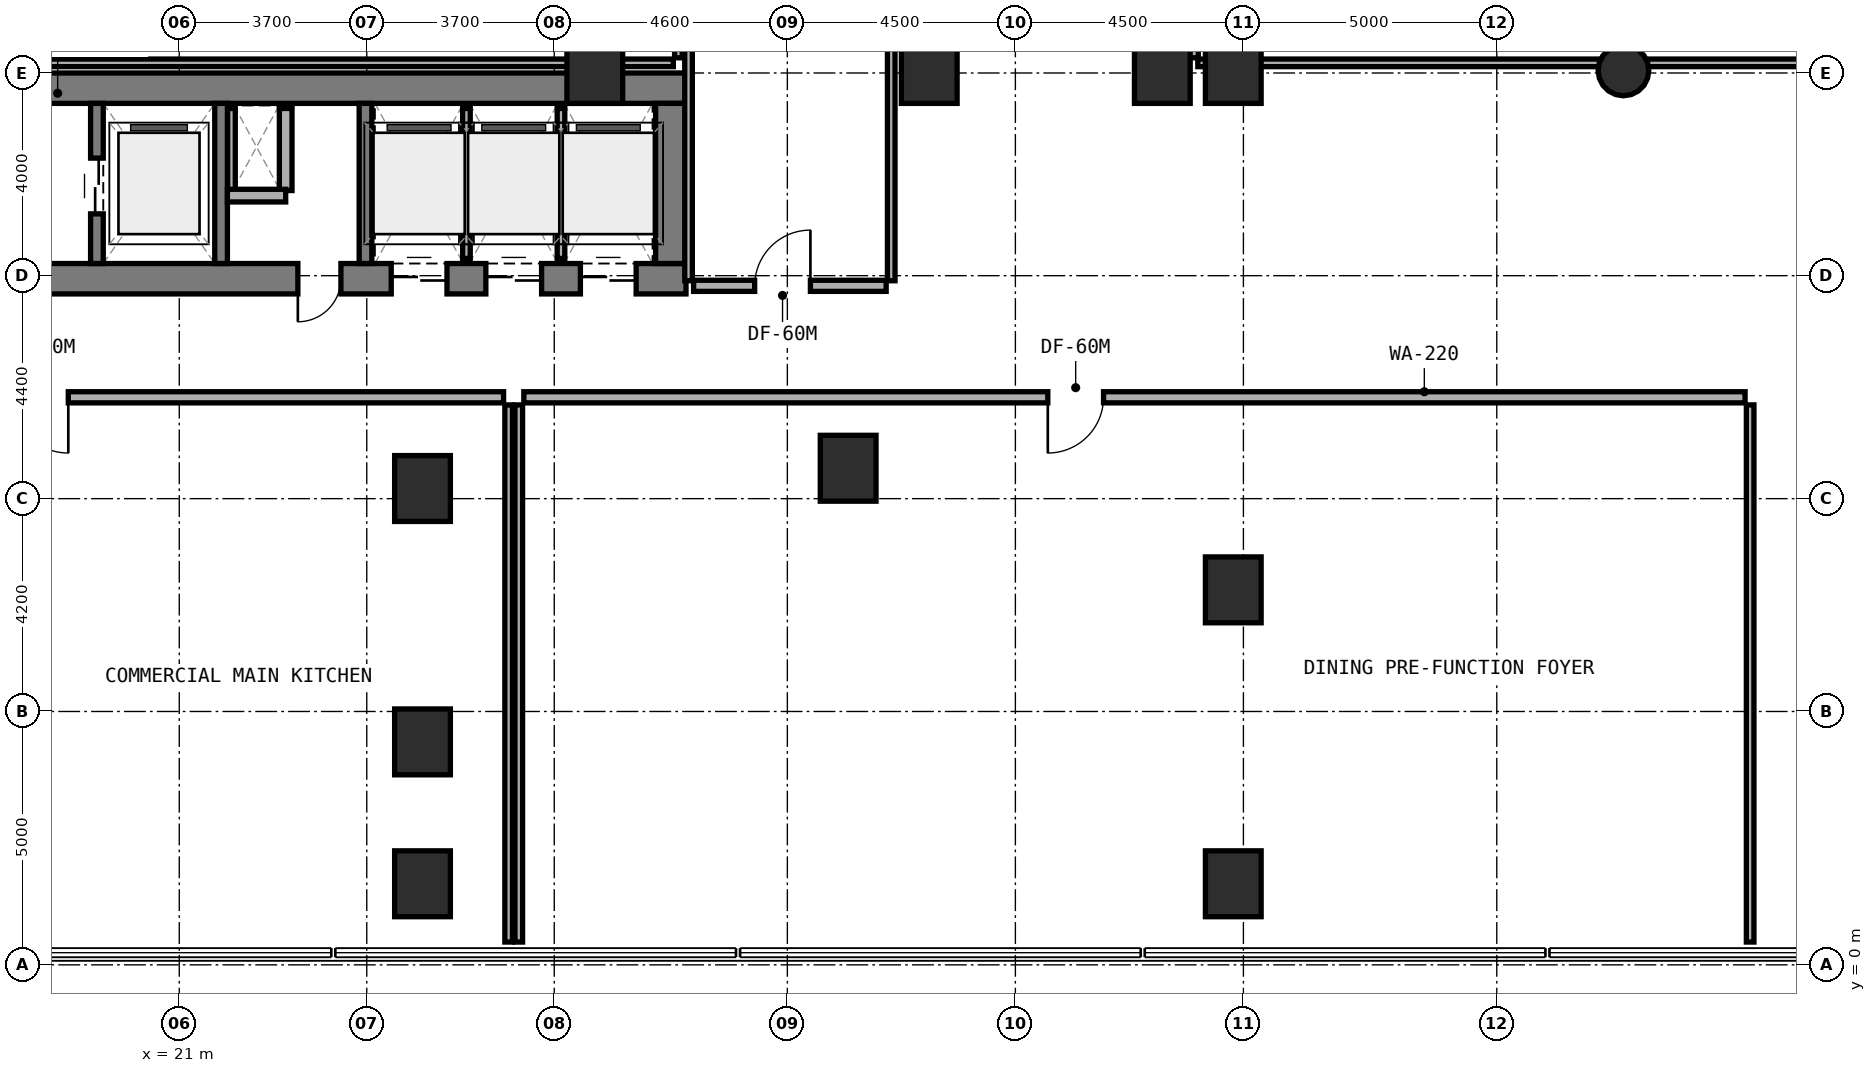
"""IFC4 building model, lengths in metres.
Left out: names, types, materials, properties, quantities, classifications, styles, units other than length and angle.
Written with IfcOpenShell. Run it as: python <this file> out.ifc"""

import sys

from ifc_helpers import new_model, si_unit, direction, frame, frame_2d, origin, origin_2d, place, context, subcontext, project, spatial, rectangle, circle, extrude, element, fill, save


model = new_model("IFC4")
c1 = context("Model", 3, precision=1e-05, world=origin(), true_north=direction((0.0, 1.0)))
c2 = subcontext(c1, "Body", "Model", "MODEL_VIEW")
j1 = project(units=[si_unit("LENGTHUNIT", "METRE"), si_unit("PLANEANGLEUNIT", "RADIAN")], contexts=[c1])
p1 = place(None, origin())
s1 = spatial("IfcSite", under=j1, at=p1, CompositionType="ELEMENT")
p2 = place(p1, origin())
s2 = spatial("IfcBuilding", under=s1, at=p2, CompositionType="ELEMENT")
p3 = place(p2, frame((0.0, 0.0, 5.4)))
s3 = spatial("IfcBuildingStorey", under=s2, at=p3, CompositionType="ELEMENT", Elevation=5.4)
p4 = place(p3, frame((6.2, 13.54, 0.0), z_axis=(0.0, 0.0, 1.0), x_axis=(1.0, 0.0, 0.0)))
e1 = element("IfcWall", 1, at=p4, inside=s3, PredefinedType="SHEAR", context=c2, shape_type="SweptSolid", body=[
    extrude(rectangle(XDim=24.8, YDim=0.6, at=frame_2d((12.4, 0.0))), origin(), (0.0, 0.0, 1.0), 4.8),
])
p5 = place(p4, frame((9.35, 0.0, 0.0)))
e2 = element("IfcOpeningElement", 2, at=p5, cuts=e1, PredefinedType="OPENING", context=c2, shape_type="SweptSolid", body=[
    extrude(rectangle(XDim=1.2, YDim=2.15, at=frame_2d((0.6, 1.075))), frame((0.0, 0.31, 0.0), z_axis=(0.0, -1.0, 0.0), x_axis=(1.0, 0.0, 0.0)), (0.0, 0.0, 1.0), 0.62),
])
p6 = place(p4, frame((17.14, 0.0, 0.0)))
e3 = element("IfcOpeningElement", 3, at=p6, cuts=e1, PredefinedType="OPENING", context=c2, shape_type="SweptSolid", body=[
    extrude(rectangle(XDim=0.85, YDim=2.1, at=frame_2d((0.425, 1.05))), frame((0.0, 0.31, 0.0), z_axis=(0.0, -1.0, 0.0), x_axis=(1.0, 0.0, 0.0)), (0.0, 0.0, 1.0), 0.62),
])
p7 = place(p4, frame((18.983, 0.0, 0.0)))
e4 = element("IfcOpeningElement", 4, at=p7, cuts=e1, PredefinedType="OPENING", context=c2, shape_type="SweptSolid", body=[
    extrude(rectangle(XDim=1.1, YDim=2.15, at=frame_2d((0.55, 1.075))), frame((0.0, 0.31, 0.0), z_axis=(0.0, -1.0, 0.0), x_axis=(1.0, 0.0, 0.0)), (0.0, 0.0, 1.0), 0.62),
])
p8 = place(p4, frame((20.85, 0.0, 0.0)))
e5 = element("IfcOpeningElement", 5, at=p8, cuts=e1, PredefinedType="OPENING", context=c2, shape_type="SweptSolid", body=[
    extrude(rectangle(XDim=1.1, YDim=2.15, at=frame_2d((0.55, 1.075))), frame((0.0, 0.31, 0.0), z_axis=(0.0, -1.0, 0.0), x_axis=(1.0, 0.0, 0.0)), (0.0, 0.0, 1.0), 0.62),
])
p9 = place(p4, frame((22.716, 0.0, 0.0)))
e6 = element("IfcOpeningElement", 6, at=p9, cuts=e1, PredefinedType="OPENING", context=c2, shape_type="SweptSolid", body=[
    extrude(rectangle(XDim=1.1, YDim=2.15, at=frame_2d((0.55, 1.075))), frame((0.0, 0.31, 0.0), z_axis=(0.0, -1.0, 0.0), x_axis=(1.0, 0.0, 0.0)), (0.0, 0.0, 1.0), 0.62),
])
p10 = place(p3, frame((6.2, 17.3, 0.0), z_axis=(0.0, 0.0, 1.0), x_axis=(1.0, 0.0, 0.0)))
e7 = element("IfcWall", 7, at=p10, inside=s3, PredefinedType="SHEAR", context=c2, shape_type="SweptSolid", body=[
    extrude(rectangle(XDim=24.8, YDim=0.6, at=frame_2d((12.4, 0.0))), origin(), (0.0, 0.0, 1.0), 4.8),
])
p11 = place(p3, frame((30.7, 13.84, 0.0), z_axis=(0.0, 0.0, 1.0), x_axis=(0.0, 1.0, 0.0)))
e8 = element("IfcWall", 8, at=p11, inside=s3, PredefinedType="SHEAR", context=c2, shape_type="SweptSolid", body=[
    extrude(rectangle(XDim=3.16, YDim=0.6, at=frame_2d((1.58, 0.0))), origin(), (0.0, 0.0, 1.0), 4.8),
])
p12 = place(p3, frame((19.375, 13.84, 0.0), z_axis=(0.0, 0.0, 1.0), x_axis=(0.0, 1.0, 0.0)))
e9 = element("IfcWall", 9, at=p12, inside=s3, PredefinedType="STANDARD", context=c2, shape_type="SweptSolid", body=[
    extrude(rectangle(XDim=3.16, YDim=0.25, at=frame_2d((1.58, 0.0))), origin(), (0.0, 0.0, 1.0), 4.45),
])
p13 = place(p12, frame((0.98, 0.0, 0.0)))
e10 = element("IfcOpeningElement", 10, at=p13, cuts=e9, PredefinedType="OPENING", context=c2, shape_type="SweptSolid", body=[
    extrude(rectangle(XDim=1.1, YDim=2.15, at=frame_2d((0.55, 1.075))), frame((0.0, 0.135, 0.0), z_axis=(0.0, -1.0, 0.0), x_axis=(1.0, 0.0, 0.0)), (0.0, 0.0, 1.0), 0.27),
])
for number, where, z_axis, x_axis in (
    (11, (21.825, 13.84, 0.0), (0.0, 0.0, 1.0), (0.0, 1.0, 0.0)),
    (12, (24.675, 13.84, 0.0), (0.0, 0.0, 1.0), (0.0, 1.0, 0.0)),
):
    element("IfcWall", number, at=place(p3, frame(where, z_axis=z_axis, x_axis=x_axis)), inside=s3, PredefinedType="STANDARD", context=c2, shape_type="SweptSolid", body=[
        extrude(rectangle(XDim=3.16, YDim=0.25, at=frame_2d((1.58, 0.0))), origin(), (0.0, 0.0, 1.0), 4.45),
    ])
for number, where, z_axis, x_axis in (
    (13, (25.8, 9.4, 0.0), (0.0, 0.0, 1.0), (1.0, 0.0, 0.0)),
    (14, (34.2, 9.8, 0.0), (0.0, 0.0, 1.0), (1.0, 0.0, 0.0)),
    (15, (35.8, 17.65, 0.0), (0.0, 0.0, 1.0), (1.0, 0.0, 0.0)),
    (16, (29.2, 17.65, 0.0), (0.0, 0.0, 1.0), (1.0, 0.0, 0.0)),
    (17, (40.4, 17.65, 0.0), (0.0, 0.0, 1.0), (1.0, 0.0, 0.0)),
    (18, (41.8, 17.65, 0.0), (0.0, 0.0, 1.0), (1.0, 0.0, 0.0)),
):
    element("IfcColumn", number, at=place(p3, frame(where, z_axis=z_axis, x_axis=x_axis)), inside=s3, PredefinedType="COLUMN", context=c2, shape_type="SweptSolid", body=[
        extrude(rectangle(XDim=1.1, YDim=1.3, at=origin_2d()), origin(), (0.0, 0.0, 1.0), 4.8),
    ])
p14 = place(p3, frame((49.5, 17.65, 0.0), z_axis=(0.0, 0.0, 1.0), x_axis=(1.0, 0.0, 0.0)))
e19 = element("IfcColumn", 19, at=p14, inside=s3, PredefinedType="COLUMN", context=c2, shape_type="SweptSolid", body=[
    extrude(circle(Radius=0.5, at=origin_2d()), origin(), (0.0, 0.0, 1.0), 4.8),
])
for number, where, z_axis, x_axis in (
    (20, (25.8, 1.6, 0.0), (0.0, 0.0, 1.0), (1.0, 0.0, 0.0)),
    (21, (41.8, 1.6, 0.0), (0.0, 0.0, 1.0), (1.0, 0.0, 0.0)),
    (22, (25.8, 4.4, 0.0), (0.0, 0.0, 1.0), (1.0, 0.0, 0.0)),
    (23, (41.8, 7.4, 0.0), (0.0, 0.0, 1.0), (1.0, 0.0, 0.0)),
):
    element("IfcColumn", number, at=place(p3, frame(where, z_axis=z_axis, x_axis=x_axis)), inside=s3, PredefinedType="COLUMN", context=c2, shape_type="SweptSolid", body=[
        extrude(rectangle(XDim=1.1, YDim=1.3, at=origin_2d()), origin(), (0.0, 0.0, 1.0), 4.8),
    ])
p15 = place(p3, frame((22.03, 15.28, 0.0), z_axis=(0.0, 0.0, 1.0), x_axis=(0.0, 1.0, 0.0)))
e24 = element("IfcWall", 24, at=p15, inside=s3, PredefinedType="PARTITIONING", context=c2, shape_type="SweptSolid", body=[
    extrude(rectangle(XDim=1.62, YDim=0.15, at=frame_2d((0.81, 0.0))), origin(), (0.0, 0.0, 1.0), 4.45),
])
p16 = place(p3, frame((23.1, 15.28, 0.0), z_axis=(0.0, 0.0, 1.0), x_axis=(0.0, 1.0, 0.0)))
e25 = element("IfcWall", 25, at=p16, inside=s3, PredefinedType="SOLIDWALL", context=c2, shape_type="SweptSolid", body=[
    extrude(rectangle(XDim=1.62, YDim=0.25, at=frame_2d((0.81, 0.0))), origin(), (0.0, 0.0, 1.0), 4.45),
])
p17 = place(p3, frame((21.95, 15.18, 0.0), z_axis=(0.0, 0.0, 1.0), x_axis=(1.0, 0.0, 0.0)))
e26 = element("IfcWall", 26, at=p17, inside=s3, PredefinedType="SOLIDWALL", context=c2, shape_type="SweptSolid", body=[
    extrude(rectangle(XDim=1.15, YDim=0.25, at=frame_2d((0.575, 0.0))), origin(), (0.0, 0.0, 1.0), 4.45),
])
p18 = place(p3, frame((26.667, 13.94, 0.0), z_axis=(0.0, 0.0, 1.0), x_axis=(0.0, 1.0, 0.0)))
e27 = element("IfcWall", 27, at=p18, inside=s3, PredefinedType="PARTITIONING", context=c2, shape_type="SweptSolid", body=[
    extrude(rectangle(XDim=2.96, YDim=0.15, at=frame_2d((1.48, 0.0))), origin(), (0.0, 0.0, 1.0), 4.45),
])
p19 = place(p3, frame((28.533, 13.94, 0.0), z_axis=(0.0, 0.0, 1.0), x_axis=(0.0, 1.0, 0.0)))
e28 = element("IfcWall", 28, at=p19, inside=s3, PredefinedType="PARTITIONING", context=c2, shape_type="SweptSolid", body=[
    extrude(rectangle(XDim=2.96, YDim=0.15, at=frame_2d((1.48, 0.0))), origin(), (0.0, 0.0, 1.0), 3.525),
])
p20 = place(p3, frame((30.85, 17.9, 0.0), z_axis=(0.0, 0.0, 1.0), x_axis=(0.0, 1.0, 0.0)))
e29 = element("IfcWall", 29, at=p20, inside=s3, PredefinedType="PARTITIONING", context=c2, shape_type="SweptSolid", body=[
    extrude(rectangle(XDim=14.2, YDim=0.15, at=frame_2d((7.1, 0.0))), origin(), (0.0, 0.0, 1.0), 3.425),
])
p21 = place(p3, frame((11.9, 17.8, 0.0), z_axis=(0.0, 0.0, 1.0), x_axis=(1.0, 0.0, 0.0)))
e30 = element("IfcWall", 30, at=p21, inside=s3, PredefinedType="PARTITIONING", context=c2, shape_type="SweptSolid", body=[
    extrude(rectangle(XDim=18.85, YDim=0.15, at=frame_2d((9.425, 0.0))), origin(), (0.0, 0.0, 1.0), 3.525),
])
for number, where, z_axis, x_axis in (
    (31, (31.05, 13.5, 0.0), (0.0, 0.0, 1.0), (0.0, 1.0, 0.0)),
    (32, (35.05, 13.5, 0.0), (0.0, 0.0, 1.0), (0.0, 1.0, 0.0)),
):
    element("IfcWall", number, at=place(p3, frame(where, z_axis=z_axis, x_axis=x_axis)), inside=s3, PredefinedType="PARTITIONING", context=c2, shape_type="SweptSolid", body=[
        extrude(rectangle(XDim=18.6, YDim=0.15, at=frame_2d((9.3, 0.0))), origin(), (0.0, 0.0, 1.0), 3.425),
    ])
p22 = place(p3, frame((31.15, 13.4, 0.0), z_axis=(0.0, 0.0, 1.0), x_axis=(1.0, 0.0, 0.0)))
e33 = element("IfcWall", 33, at=p22, inside=s3, PredefinedType="SOLIDWALL", context=c2, shape_type="SweptSolid", body=[
    extrude(rectangle(XDim=3.8, YDim=0.22, at=frame_2d((1.9, 0.0))), origin(), (0.0, 0.0, 1.0), 3.975),
])
p23 = place(p22, frame((1.205, 0.0, 0.0)))
e34 = element("IfcOpeningElement", 34, at=p23, cuts=e33, PredefinedType="OPENING", context=c2, shape_type="SweptSolid", body=[
    extrude(rectangle(XDim=1.1, YDim=2.1, at=frame_2d((0.55, 1.05))), frame((0.0, 0.12, 0.0), z_axis=(0.0, -1.0, 0.0), x_axis=(1.0, 0.0, 0.0)), (0.0, 0.0, 1.0), 0.24),
])
p24 = place(p3, frame((27.5, 0.45, 0.0), z_axis=(0.0, 0.0, 1.0), x_axis=(0.0, 1.0, 0.0)))
e35 = element("IfcWall", 35, at=p24, inside=s3, PredefinedType="PARTITIONING", context=c2, shape_type="SweptSolid", body=[
    extrude(rectangle(XDim=10.6, YDim=0.15, at=frame_2d((5.3, 0.0))), origin(), (0.0, 0.0, 1.0), 3.975),
])
p25 = place(p3, frame((10.7, 11.2, 0.0), z_axis=(0.0, 0.0, 1.0), x_axis=(1.0, 0.0, 0.0)))
e36 = element("IfcWall", 36, at=p25, inside=s3, PredefinedType="SOLIDWALL", context=c2, shape_type="SweptSolid", body=[
    extrude(rectangle(XDim=16.7, YDim=0.22, at=frame_2d((8.35, 0.0))), origin(), (0.0, 0.0, 1.0), 3.525),
])
p26 = place(p25, frame((7.01, 0.0, 0.0)))
e37 = element("IfcOpeningElement", 37, at=p26, cuts=e36, PredefinedType="OPENING", context=c2, shape_type="SweptSolid", body=[
    extrude(rectangle(XDim=1.1, YDim=2.1, at=frame_2d((0.55, 1.05))), frame((0.0, 0.12, 0.0), z_axis=(0.0, -1.0, 0.0), x_axis=(1.0, 0.0, 0.0)), (0.0, 0.0, 1.0), 0.24),
])
p27 = place(p3, frame((27.7, 0.45, 0.0), z_axis=(0.0, 0.0, 1.0), x_axis=(0.0, 1.0, 0.0)))
e38 = element("IfcWall", 38, at=p27, inside=s3, PredefinedType="PARTITIONING", context=c2, shape_type="SweptSolid", body=[
    extrude(rectangle(XDim=10.6, YDim=0.15, at=frame_2d((5.3, 0.0))), origin(), (0.0, 0.0, 1.0), 3.975),
])
p28 = place(p3, frame((52.0, 0.45, 0.0), z_axis=(0.0, 0.0, 1.0), x_axis=(0.0, 1.0, 0.0)))
e39 = element("IfcWall", 39, at=p28, inside=s3, PredefinedType="PARTITIONING", context=c2, shape_type="SweptSolid", body=[
    extrude(rectangle(XDim=10.6, YDim=0.15, at=frame_2d((5.3, 0.0))), origin(), (0.0, 0.0, 1.0), 3.625),
])
p29 = place(p3, frame((27.8, 11.2, 0.0), z_axis=(0.0, 0.0, 1.0), x_axis=(1.0, 0.0, 0.0)))
e40 = element("IfcWall", 40, at=p29, inside=s3, PredefinedType="SOLIDWALL", context=c2, shape_type="SweptSolid", body=[
    extrude(rectangle(XDim=24.1, YDim=0.22, at=frame_2d((12.05, 0.0))), origin(), (0.0, 0.0, 1.0), 3.725),
])
p30 = place(p29, frame((10.34, 0.0, 0.0)))
e41 = element("IfcOpeningElement", 41, at=p30, cuts=e40, PredefinedType="OPENING", context=c2, shape_type="SweptSolid", body=[
    extrude(rectangle(XDim=1.1, YDim=2.1, at=frame_2d((0.55, 1.05))), frame((0.0, 0.12, 0.0), z_axis=(0.0, -1.0, 0.0), x_axis=(1.0, 0.0, 0.0)), (0.0, 0.0, 1.0), 0.24),
])
p31 = place(p3, frame((41.1, 17.8, 0.0), z_axis=(0.0, 0.0, 1.0), x_axis=(1.0, 0.0, 0.0)))
e42 = element("IfcWall", 42, at=p31, inside=s3, PredefinedType="PARTITIONING", context=c2, shape_type="SweptSolid", body=[
    extrude(rectangle(XDim=16.6, YDim=0.15, at=frame_2d((8.3, 0.0))), origin(), (0.0, 0.0, 1.0), 3.725),
])
p32 = place(p3, frame((41.0, 17.9, 0.0), z_axis=(0.0, 0.0, 1.0), x_axis=(0.0, 1.0, 0.0)))
e43 = element("IfcWall", 43, at=p32, inside=s3, PredefinedType="SOLIDWALL", context=c2, shape_type="SweptSolid", body=[
    extrude(rectangle(XDim=14.2, YDim=0.22, at=frame_2d((7.1, 0.0))), origin(), (0.0, 0.0, 1.0), 4.45),
])
p33 = place(p32, frame((5.885, 0.0, 0.0)))
e44 = element("IfcOpeningElement", 44, at=p33, cuts=e43, PredefinedType="OPENING", context=c2, shape_type="SweptSolid", body=[
    extrude(rectangle(XDim=1.1, YDim=2.1, at=frame_2d((0.55, 1.05))), frame((0.0, 0.12, 0.0), z_axis=(0.0, -1.0, 0.0), x_axis=(1.0, 0.0, 0.0)), (0.0, 0.0, 1.0), 0.24),
])
p34 = place(p13, origin())
e45 = element("IfcDoor", 45, at=p34, inside=s3, OperationType="DOUBLE_DOOR_SLIDING", PredefinedType="DOOR", context=c2, shape_type="SweptSolid", body=[
    extrude(rectangle(XDim=1.1, YDim=2.15, at=frame_2d((0.55, 1.075))), frame((0.0, 0.025, 0.0), z_axis=(0.0, -1.0, 0.0), x_axis=(1.0, 0.0, 0.0)), (0.0, 0.0, 1.0), 0.05),
])
fill(e10, e45)
p35 = place(p6, frame((0.85, 0.0, 0.0), z_axis=(0.0, 0.0, 1.0), x_axis=(-1.0, 0.0, 0.0)))
e46 = element("IfcDoor", 46, at=p35, inside=s3, OperationType="SINGLE_SWING_RIGHT", PredefinedType="DOOR", context=c2, shape_type="SweptSolid", body=[
    extrude(rectangle(XDim=0.85, YDim=2.1, at=frame_2d((0.425, 1.05))), frame((0.0, 0.025, 0.0), z_axis=(0.0, -1.0, 0.0), x_axis=(1.0, 0.0, 0.0)), (0.0, 0.0, 1.0), 0.05),
])
fill(e3, e46)
p36 = place(p7, frame((1.1, 0.0, 0.0), z_axis=(0.0, 0.0, 1.0), x_axis=(-1.0, 0.0, 0.0)))
e47 = element("IfcDoor", 47, at=p36, inside=s3, OperationType="DOUBLE_DOOR_SLIDING", PredefinedType="DOOR", context=c2, shape_type="SweptSolid", body=[
    extrude(rectangle(XDim=1.1, YDim=2.15, at=frame_2d((0.55, 1.075))), frame((0.0, 0.025, 0.0), z_axis=(0.0, -1.0, 0.0), x_axis=(1.0, 0.0, 0.0)), (0.0, 0.0, 1.0), 0.05),
])
fill(e4, e47)
p37 = place(p8, frame((1.1, 0.0, 0.0), z_axis=(0.0, 0.0, 1.0), x_axis=(-1.0, 0.0, 0.0)))
e48 = element("IfcDoor", 48, at=p37, inside=s3, OperationType="DOUBLE_DOOR_SLIDING", PredefinedType="DOOR", context=c2, shape_type="SweptSolid", body=[
    extrude(rectangle(XDim=1.1, YDim=2.15, at=frame_2d((0.55, 1.075))), frame((0.0, 0.025, 0.0), z_axis=(0.0, -1.0, 0.0), x_axis=(1.0, 0.0, 0.0)), (0.0, 0.0, 1.0), 0.05),
])
fill(e5, e48)
p38 = place(p9, frame((1.1, 0.0, 0.0), z_axis=(0.0, 0.0, 1.0), x_axis=(-1.0, 0.0, 0.0)))
e49 = element("IfcDoor", 49, at=p38, inside=s3, OperationType="DOUBLE_DOOR_SLIDING", PredefinedType="DOOR", context=c2, shape_type="SweptSolid", body=[
    extrude(rectangle(XDim=1.1, YDim=2.15, at=frame_2d((0.55, 1.075))), frame((0.0, 0.025, 0.0), z_axis=(0.0, -1.0, 0.0), x_axis=(1.0, 0.0, 0.0)), (0.0, 0.0, 1.0), 0.05),
])
fill(e6, e49)
p39 = place(p23, origin())
e50 = element("IfcDoor", 50, at=p39, inside=s3, OperationType="SINGLE_SWING_RIGHT", PredefinedType="DOOR", context=c2, shape_type="SweptSolid", body=[
    extrude(rectangle(XDim=1.1, YDim=2.1, at=frame_2d((0.55, 1.05))), frame((0.0, 0.025, 0.0), z_axis=(0.0, -1.0, 0.0), x_axis=(1.0, 0.0, 0.0)), (0.0, 0.0, 1.0), 0.05),
])
fill(e34, e50)
p40 = place(p26, frame((1.1, 0.0, 0.0), z_axis=(0.0, 0.0, 1.0), x_axis=(-1.0, 0.0, 0.0)))
e51 = element("IfcDoor", 51, at=p40, inside=s3, OperationType="SINGLE_SWING_LEFT", PredefinedType="DOOR", context=c2, shape_type="SweptSolid", body=[
    extrude(rectangle(XDim=1.1, YDim=2.1, at=frame_2d((0.55, 1.05))), frame((0.0, 0.025, 0.0), z_axis=(0.0, -1.0, 0.0), x_axis=(1.0, 0.0, 0.0)), (0.0, 0.0, 1.0), 0.05),
])
fill(e37, e51)
p41 = place(p30, frame((1.1, 0.0, 0.0), z_axis=(0.0, 0.0, 1.0), x_axis=(-1.0, 0.0, 0.0)))
e52 = element("IfcDoor", 52, at=p41, inside=s3, OperationType="SINGLE_SWING_RIGHT", PredefinedType="DOOR", context=c2, shape_type="SweptSolid", body=[
    extrude(rectangle(XDim=1.1, YDim=2.1, at=frame_2d((0.55, 1.05))), frame((0.0, 0.025, 0.0), z_axis=(0.0, -1.0, 0.0), x_axis=(1.0, 0.0, 0.0)), (0.0, 0.0, 1.0), 0.05),
])
fill(e41, e52)
save(model, sys.argv[1])
